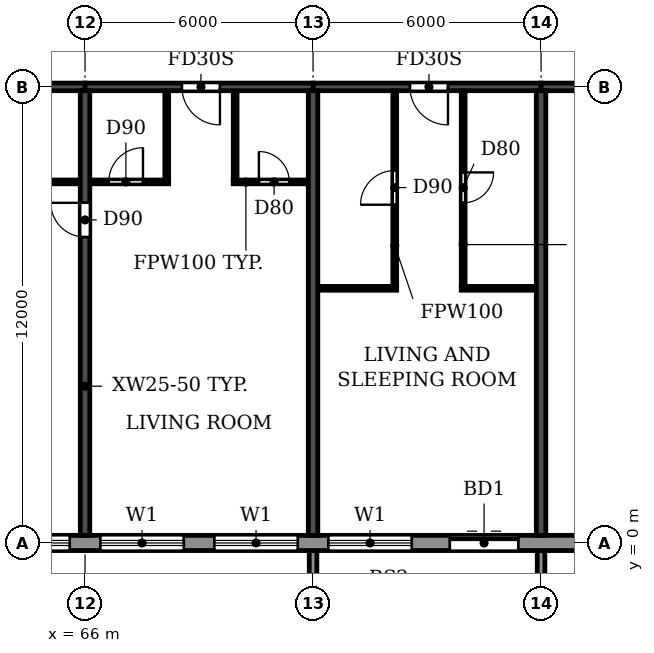
"""IFC4 building model, lengths in metres.
Left out: names, types, materials, properties, quantities, classifications, styles, units other than length and angle.
Written with IfcOpenShell. Run it as: python <this file> out.ifc"""

import sys

from ifc_helpers import new_model, si_unit, direction, frame, frame_2d, origin, place, context, subcontext, project, spatial, polyline, rectangle, outline, extrude, source, transform, mapped, element, fill, save


model = new_model("IFC4")
c1 = context("Model", 3, precision=1e-05, world=origin(), true_north=direction((0.0, 1.0)))
c2 = subcontext(c1, "Body", "Model", "MODEL_VIEW")
j1 = project(units=[si_unit("LENGTHUNIT", "METRE"), si_unit("PLANEANGLEUNIT", "RADIAN")], contexts=[c1])
p1 = place(None, origin())
s1 = spatial("IfcSite", under=j1, at=p1, CompositionType="ELEMENT")
p2 = place(p1, origin())
s2 = spatial("IfcBuilding", under=s1, at=p2, CompositionType="ELEMENT")
p3 = place(p2, frame((0.0, 0.0, 201.6)))
s3 = spatial("IfcBuildingStorey", under=s2, at=p3, CompositionType="ELEMENT", Elevation=201.6)
p4 = place(p3, frame((66.0, 0.2, 0.0), z_axis=(0.0, 0.0, 1.0), x_axis=(0.0, 1.0, 0.0)))
e1 = element("IfcWall", 1, at=p4, inside=s3, PredefinedType="SHEAR", context=c2, shape_type="SweptSolid", body=[
    extrude(rectangle(XDim=11.7, YDim=0.25, at=frame_2d((5.85, 0.0))), origin(), (0.0, 0.0, 1.0), 3.08),
])
p5 = place(p4, frame((7.85, 0.0, 0.0)))
e2 = element("IfcOpeningElement", 2, at=p5, cuts=e1, PredefinedType="OPENING", context=c2, shape_type="SweptSolid", body=[
    extrude(rectangle(XDim=0.9, YDim=2.1, at=frame_2d((0.45, 1.05))), frame((0.0, 0.135, 0.0), z_axis=(0.0, -1.0, 0.0), x_axis=(1.0, 0.0, 0.0)), (0.0, 0.0, 1.0), 0.27),
])
for number, where, z_axis, x_axis in (
    (3, (72.0, 0.2, 0.0), (0.0, 0.0, 1.0), (0.0, 1.0, 0.0)),
    (4, (78.0, 0.2, 0.0), (0.0, 0.0, 1.0), (0.0, 1.0, 0.0)),
):
    element("IfcWall", number, at=place(p3, frame(where, z_axis=z_axis, x_axis=x_axis)), inside=s3, PredefinedType="SHEAR", context=c2, shape_type="SweptSolid", body=[
        extrude(rectangle(XDim=11.7, YDim=0.25, at=frame_2d((5.85, 0.0))), origin(), (0.0, 0.0, 1.0), 3.08),
    ])
p6 = place(p3, frame((60.0, 12.0, 0.0), z_axis=(0.0, 0.0, 1.0), x_axis=(1.0, 0.0, 0.0)))
e5 = element("IfcWall", 5, at=p6, inside=s3, PredefinedType="SHEAR", context=c2, shape_type="SweptSolid", body=[
    extrude(rectangle(XDim=6.0, YDim=0.2, at=frame_2d((3.0, 0.0))), origin(), (0.0, 0.0, 1.0), 2.48),
])
p7 = place(p3, frame((66.0, 12.0, 0.0), z_axis=(0.0, 0.0, 1.0), x_axis=(1.0, 0.0, 0.0)))
e6 = element("IfcWall", 6, at=p7, inside=s3, PredefinedType="SHEAR", context=c2, shape_type="SweptSolid", body=[
    extrude(rectangle(XDim=6.0, YDim=0.2, at=frame_2d((3.0, 0.0))), origin(), (0.0, 0.0, 1.0), 2.48),
])
p8 = place(p7, frame((2.55, 0.0, 0.0)))
e7 = element("IfcOpeningElement", 7, at=p8, cuts=e6, PredefinedType="OPENING", context=c2, shape_type="SweptSolid", body=[
    extrude(rectangle(XDim=1.0, YDim=2.1, at=frame_2d((0.5, 1.05))), frame((0.0, 0.11, 0.0), z_axis=(0.0, -1.0, 0.0), x_axis=(1.0, 0.0, 0.0)), (0.0, 0.0, 1.0), 0.22),
])
p9 = place(p3, frame((72.0, 12.0, 0.0), z_axis=(0.0, 0.0, 1.0), x_axis=(1.0, 0.0, 0.0)))
e8 = element("IfcWall", 8, at=p9, inside=s3, PredefinedType="SHEAR", context=c2, shape_type="SweptSolid", body=[
    extrude(rectangle(XDim=6.0, YDim=0.2, at=frame_2d((3.0, 0.0))), origin(), (0.0, 0.0, 1.0), 2.48),
])
p10 = place(p9, frame((2.55, 0.0, 0.0)))
e9 = element("IfcOpeningElement", 9, at=p10, cuts=e8, PredefinedType="OPENING", context=c2, shape_type="SweptSolid", body=[
    extrude(rectangle(XDim=1.0, YDim=2.1, at=frame_2d((0.5, 1.05))), frame((0.0, 0.11, 0.0), z_axis=(0.0, -1.0, 0.0), x_axis=(1.0, 0.0, 0.0)), (0.0, 0.0, 1.0), 0.22),
])
p11 = place(p3, frame((78.0, 12.0, 0.0), z_axis=(0.0, 0.0, 1.0), x_axis=(1.0, 0.0, 0.0)))
e10 = element("IfcWall", 10, at=p11, inside=s3, PredefinedType="SHEAR", context=c2, shape_type="SweptSolid", body=[
    extrude(rectangle(XDim=5.8, YDim=0.2, at=frame_2d((2.9, 0.0))), origin(), (0.0, 0.0, 1.0), 2.48),
])
p12 = place(p11, frame((2.5, 0.0, 0.0)))
e11 = element("IfcOpeningElement", 11, at=p12, cuts=e10, PredefinedType="OPENING", context=c2, shape_type="SweptSolid", body=[
    extrude(rectangle(XDim=1.0, YDim=2.1, at=frame_2d((0.5, 1.05))), frame((0.0, 0.11, 0.0), z_axis=(0.0, -1.0, 0.0), x_axis=(1.0, 0.0, 0.0)), (0.0, 0.0, 1.0), 0.22),
])
p13 = place(p3, frame((22.683, 0.0, 0.0), z_axis=(0.0, 0.0, 1.0), x_axis=(1.0, 0.0, 0.0)))
e12 = element("IfcWall", 12, at=p13, inside=s3, PredefinedType="STANDARD", context=c2, shape_type="SweptSolid", body=[
    extrude(rectangle(XDim=56.634, YDim=0.4, at=frame_2d((28.317, 0.0))), origin(), (0.0, 0.0, 1.0), 3.08),
])
p14 = place(p13, frame((1.917, 0.0, 0.0)))
e13 = element("IfcOpeningElement", 13, at=p14, cuts=e12, PredefinedType="OPENING", context=c2, shape_type="SweptSolid", body=[
    extrude(rectangle(XDim=1.8, YDim=2.4, at=frame_2d((0.9, 1.2))), frame((0.0, 0.21, 0.0), z_axis=(0.0, -1.0, 0.0), x_axis=(1.0, 0.0, 0.0)), (0.0, 0.0, 1.0), 0.42),
])
p15 = place(p13, frame((4.717, 0.0, 0.9)))
e14 = element("IfcOpeningElement", 14, at=p15, cuts=e12, PredefinedType="OPENING", context=c2, shape_type="SweptSolid", body=[
    extrude(rectangle(XDim=2.2, YDim=1.5, at=frame_2d((1.1, 0.75))), frame((0.0, 0.21, 0.0), z_axis=(0.0, -1.0, 0.0), x_axis=(1.0, 0.0, 0.0)), (0.0, 0.0, 1.0), 0.42),
])
p16 = place(p13, frame((7.717, 0.0, 0.9)))
e15 = element("IfcOpeningElement", 15, at=p16, cuts=e12, PredefinedType="OPENING", context=c2, shape_type="SweptSolid", body=[
    extrude(rectangle(XDim=2.2, YDim=1.5, at=frame_2d((1.1, 0.75))), frame((0.0, 0.21, 0.0), z_axis=(0.0, -1.0, 0.0), x_axis=(1.0, 0.0, 0.0)), (0.0, 0.0, 1.0), 0.42),
])
p17 = place(p13, frame((10.717, 0.0, 0.9)))
e16 = element("IfcOpeningElement", 16, at=p17, cuts=e12, PredefinedType="OPENING", context=c2, shape_type="SweptSolid", body=[
    extrude(rectangle(XDim=2.2, YDim=1.5, at=frame_2d((1.1, 0.75))), frame((0.0, 0.21, 0.0), z_axis=(0.0, -1.0, 0.0), x_axis=(1.0, 0.0, 0.0)), (0.0, 0.0, 1.0), 0.42),
])
p18 = place(p13, frame((13.917, 0.0, 0.0)))
e17 = element("IfcOpeningElement", 17, at=p18, cuts=e12, PredefinedType="OPENING", context=c2, shape_type="SweptSolid", body=[
    extrude(rectangle(XDim=1.8, YDim=2.4, at=frame_2d((0.9, 1.2))), frame((0.0, 0.21, 0.0), z_axis=(0.0, -1.0, 0.0), x_axis=(1.0, 0.0, 0.0)), (0.0, 0.0, 1.0), 0.42),
])
p19 = place(p13, frame((16.717, 0.0, 0.9)))
e18 = element("IfcOpeningElement", 18, at=p19, cuts=e12, PredefinedType="OPENING", context=c2, shape_type="SweptSolid", body=[
    extrude(rectangle(XDim=2.2, YDim=1.5, at=frame_2d((1.1, 0.75))), frame((0.0, 0.21, 0.0), z_axis=(0.0, -1.0, 0.0), x_axis=(1.0, 0.0, 0.0)), (0.0, 0.0, 1.0), 0.42),
])
p20 = place(p13, frame((19.717, 0.0, 0.9)))
e19 = element("IfcOpeningElement", 19, at=p20, cuts=e12, PredefinedType="OPENING", context=c2, shape_type="SweptSolid", body=[
    extrude(rectangle(XDim=2.2, YDim=1.5, at=frame_2d((1.1, 0.75))), frame((0.0, 0.21, 0.0), z_axis=(0.0, -1.0, 0.0), x_axis=(1.0, 0.0, 0.0)), (0.0, 0.0, 1.0), 0.42),
])
p21 = place(p13, frame((22.717, 0.0, 0.9)))
e20 = element("IfcOpeningElement", 20, at=p21, cuts=e12, PredefinedType="OPENING", context=c2, shape_type="SweptSolid", body=[
    extrude(rectangle(XDim=2.2, YDim=1.5, at=frame_2d((1.1, 0.75))), frame((0.0, 0.21, 0.0), z_axis=(0.0, -1.0, 0.0), x_axis=(1.0, 0.0, 0.0)), (0.0, 0.0, 1.0), 0.42),
])
p22 = place(p13, frame((25.917, 0.0, 0.0)))
e21 = element("IfcOpeningElement", 21, at=p22, cuts=e12, PredefinedType="OPENING", context=c2, shape_type="SweptSolid", body=[
    extrude(rectangle(XDim=1.8, YDim=2.4, at=frame_2d((0.9, 1.2))), frame((0.0, 0.21, 0.0), z_axis=(0.0, -1.0, 0.0), x_axis=(1.0, 0.0, 0.0)), (0.0, 0.0, 1.0), 0.42),
])
p23 = place(p13, frame((28.717, 0.0, 0.9)))
e22 = element("IfcOpeningElement", 22, at=p23, cuts=e12, PredefinedType="OPENING", context=c2, shape_type="SweptSolid", body=[
    extrude(rectangle(XDim=2.2, YDim=1.5, at=frame_2d((1.1, 0.75))), frame((0.0, 0.21, 0.0), z_axis=(0.0, -1.0, 0.0), x_axis=(1.0, 0.0, 0.0)), (0.0, 0.0, 1.0), 0.42),
])
p24 = place(p13, frame((31.717, 0.0, 0.9)))
e23 = element("IfcOpeningElement", 23, at=p24, cuts=e12, PredefinedType="OPENING", context=c2, shape_type="SweptSolid", body=[
    extrude(rectangle(XDim=2.2, YDim=1.5, at=frame_2d((1.1, 0.75))), frame((0.0, 0.21, 0.0), z_axis=(0.0, -1.0, 0.0), x_axis=(1.0, 0.0, 0.0)), (0.0, 0.0, 1.0), 0.42),
])
p25 = place(p13, frame((34.717, 0.0, 0.9)))
e24 = element("IfcOpeningElement", 24, at=p25, cuts=e12, PredefinedType="OPENING", context=c2, shape_type="SweptSolid", body=[
    extrude(rectangle(XDim=2.2, YDim=1.5, at=frame_2d((1.1, 0.75))), frame((0.0, 0.21, 0.0), z_axis=(0.0, -1.0, 0.0), x_axis=(1.0, 0.0, 0.0)), (0.0, 0.0, 1.0), 0.42),
])
p26 = place(p13, frame((37.717, 0.0, 0.9)))
e25 = element("IfcOpeningElement", 25, at=p26, cuts=e12, PredefinedType="OPENING", context=c2, shape_type="SweptSolid", body=[
    extrude(rectangle(XDim=2.2, YDim=1.5, at=frame_2d((1.1, 0.75))), frame((0.0, 0.21, 0.0), z_axis=(0.0, -1.0, 0.0), x_axis=(1.0, 0.0, 0.0)), (0.0, 0.0, 1.0), 0.42),
])
p27 = place(p13, frame((40.717, 0.0, 0.9)))
e26 = element("IfcOpeningElement", 26, at=p27, cuts=e12, PredefinedType="OPENING", context=c2, shape_type="SweptSolid", body=[
    extrude(rectangle(XDim=2.2, YDim=1.5, at=frame_2d((1.1, 0.75))), frame((0.0, 0.21, 0.0), z_axis=(0.0, -1.0, 0.0), x_axis=(1.0, 0.0, 0.0)), (0.0, 0.0, 1.0), 0.42),
])
p28 = place(p13, frame((43.717, 0.0, 0.9)))
e27 = element("IfcOpeningElement", 27, at=p28, cuts=e12, PredefinedType="OPENING", context=c2, shape_type="SweptSolid", body=[
    extrude(rectangle(XDim=2.2, YDim=1.5, at=frame_2d((1.1, 0.75))), frame((0.0, 0.21, 0.0), z_axis=(0.0, -1.0, 0.0), x_axis=(1.0, 0.0, 0.0)), (0.0, 0.0, 1.0), 0.42),
])
p29 = place(p13, frame((46.717, 0.0, 0.9)))
e28 = element("IfcOpeningElement", 28, at=p29, cuts=e12, PredefinedType="OPENING", context=c2, shape_type="SweptSolid", body=[
    extrude(rectangle(XDim=2.2, YDim=1.5, at=frame_2d((1.1, 0.75))), frame((0.0, 0.21, 0.0), z_axis=(0.0, -1.0, 0.0), x_axis=(1.0, 0.0, 0.0)), (0.0, 0.0, 1.0), 0.42),
])
p30 = place(p13, frame((49.717, 0.0, 0.9)))
e29 = element("IfcOpeningElement", 29, at=p30, cuts=e12, PredefinedType="OPENING", context=c2, shape_type="SweptSolid", body=[
    extrude(rectangle(XDim=2.2, YDim=1.5, at=frame_2d((1.1, 0.75))), frame((0.0, 0.21, 0.0), z_axis=(0.0, -1.0, 0.0), x_axis=(1.0, 0.0, 0.0)), (0.0, 0.0, 1.0), 0.42),
])
p31 = place(p13, frame((52.917, 0.0, 0.0)))
e30 = element("IfcOpeningElement", 30, at=p31, cuts=e12, PredefinedType="OPENING", context=c2, shape_type="SweptSolid", body=[
    extrude(rectangle(XDim=1.8, YDim=2.4, at=frame_2d((0.9, 1.2))), frame((0.0, 0.21, 0.0), z_axis=(0.0, -1.0, 0.0), x_axis=(1.0, 0.0, 0.0)), (0.0, 0.0, 1.0), 0.42),
])
m1 = source(origin(), c2, "Body", "SweptSolid", [
    extrude(outline(polyline([(0.0, 0.0), (0.2, 0.0), (0.2, 1.65), (0.0, 1.65), (0.0, 0.0)])), origin(), (0.0, 0.0, 1.0), 3.1),
])
for number, where in (
    (31, (71.9, -1.85, 0.0)),
    (32, (77.9, -1.85, 0.0)),
):
    element("IfcWall", number, at=place(p3, frame(where)), inside=s3, PredefinedType="STANDARD", context=c2, shape_type="MappedRepresentation", body=[
        mapped(m1, transform((0.0, 0.0, 0.0))),
    ])
p32 = place(p3, frame((72.135, 6.7, 0.0), z_axis=(0.0, 0.0, 1.0), x_axis=(1.0, 0.0, 0.0)))
e33 = element("IfcWall", 33, at=p32, inside=s3, PredefinedType="PARTITIONING", context=c2, shape_type="SweptSolid", body=[
    extrude(rectangle(XDim=2.065, YDim=0.1, at=frame_2d((1.032, 0.0))), origin(), (0.0, 0.0, 1.0), 3.08),
])
p33 = place(p3, frame((75.9, 6.7, 0.0), z_axis=(0.0, 0.0, 1.0), x_axis=(1.0, 0.0, 0.0)))
e34 = element("IfcWall", 34, at=p33, inside=s3, PredefinedType="PARTITIONING", context=c2, shape_type="SweptSolid", body=[
    extrude(rectangle(XDim=1.965, YDim=0.1, at=frame_2d((0.982, 0.0))), origin(), (0.0, 0.0, 1.0), 3.08),
])
p34 = place(p3, frame((63.1, 9.5, 0.0), z_axis=(0.0, 0.0, 1.0), x_axis=(1.0, 0.0, 0.0)))
e35 = element("IfcWall", 35, at=p34, inside=s3, PredefinedType="PARTITIONING", context=c2, shape_type="SweptSolid", body=[
    extrude(rectangle(XDim=2.765, YDim=0.1, at=frame_2d((1.382, 0.0))), origin(), (0.0, 0.0, 1.0), 3.08),
])
p35 = place(p34, frame((1.0, 0.0, 0.0)))
e36 = element("IfcOpeningElement", 36, at=p35, cuts=e35, PredefinedType="OPENING", context=c2, shape_type="SweptSolid", body=[
    extrude(rectangle(XDim=0.8, YDim=2.1, at=frame_2d((0.4, 1.05))), frame((0.0, 0.06, 0.0), z_axis=(0.0, -1.0, 0.0), x_axis=(1.0, 0.0, 0.0)), (0.0, 0.0, 1.0), 0.12),
])
p36 = place(p3, frame((66.135, 9.5, 0.0), z_axis=(0.0, 0.0, 1.0), x_axis=(1.0, 0.0, 0.0)))
e37 = element("IfcWall", 37, at=p36, inside=s3, PredefinedType="PARTITIONING", context=c2, shape_type="SweptSolid", body=[
    extrude(rectangle(XDim=2.065, YDim=0.1, at=frame_2d((1.032, 0.0))), origin(), (0.0, 0.0, 1.0), 3.08),
])
p37 = place(p36, frame((0.49, 0.0, 0.0)))
e38 = element("IfcOpeningElement", 38, at=p37, cuts=e37, PredefinedType="OPENING", context=c2, shape_type="SweptSolid", body=[
    extrude(rectangle(XDim=0.9, YDim=2.1, at=frame_2d((0.45, 1.05))), frame((0.0, 0.06, 0.0), z_axis=(0.0, -1.0, 0.0), x_axis=(1.0, 0.0, 0.0)), (0.0, 0.0, 1.0), 0.12),
])
p38 = place(p3, frame((69.9, 9.5, 0.0), z_axis=(0.0, 0.0, 1.0), x_axis=(1.0, 0.0, 0.0)))
e39 = element("IfcWall", 39, at=p38, inside=s3, PredefinedType="PARTITIONING", context=c2, shape_type="SweptSolid", body=[
    extrude(rectangle(XDim=1.965, YDim=0.1, at=frame_2d((0.982, 0.0))), origin(), (0.0, 0.0, 1.0), 3.08),
])
p39 = place(p38, frame((0.675, 0.0, 0.0)))
e40 = element("IfcOpeningElement", 40, at=p39, cuts=e39, PredefinedType="OPENING", context=c2, shape_type="SweptSolid", body=[
    extrude(rectangle(XDim=0.8, YDim=2.1, at=frame_2d((0.4, 1.05))), frame((0.0, 0.06, 0.0), z_axis=(0.0, -1.0, 0.0), x_axis=(1.0, 0.0, 0.0)), (0.0, 0.0, 1.0), 0.12),
])
for number, where, z_axis, x_axis in (
    (41, (68.15, 9.55, 0.0), (0.0, 0.0, 1.0), (0.0, 1.0, 0.0)),
    (42, (69.95, 9.55, 0.0), (0.0, 0.0, 1.0), (0.0, 1.0, 0.0)),
):
    element("IfcWall", number, at=place(p3, frame(where, z_axis=z_axis, x_axis=x_axis)), inside=s3, PredefinedType="PARTITIONING", context=c2, shape_type="SweptSolid", body=[
        extrude(rectangle(XDim=2.34, YDim=0.1, at=frame_2d((1.17, 0.0))), origin(), (0.0, 0.0, 1.0), 3.08),
    ])
p40 = place(p3, frame((74.15, 6.75, 0.0), z_axis=(0.0, 0.0, 1.0), x_axis=(0.0, 1.0, 0.0)))
e43 = element("IfcWall", 43, at=p40, inside=s3, PredefinedType="PARTITIONING", context=c2, shape_type="SweptSolid", body=[
    extrude(rectangle(XDim=5.14, YDim=0.1, at=frame_2d((2.57, 0.0))), origin(), (0.0, 0.0, 1.0), 3.08),
])
p41 = place(p40, frame((2.15, 0.0, 0.0)))
e44 = element("IfcOpeningElement", 44, at=p41, cuts=e43, PredefinedType="OPENING", context=c2, shape_type="SweptSolid", body=[
    extrude(rectangle(XDim=0.9, YDim=2.1, at=frame_2d((0.45, 1.05))), frame((0.0, 0.06, 0.0), z_axis=(0.0, -1.0, 0.0), x_axis=(1.0, 0.0, 0.0)), (0.0, 0.0, 1.0), 0.12),
])
p42 = place(p3, frame((75.95, 6.75, 0.0), z_axis=(0.0, 0.0, 1.0), x_axis=(0.0, 1.0, 0.0)))
e45 = element("IfcWall", 45, at=p42, inside=s3, PredefinedType="PARTITIONING", context=c2, shape_type="SweptSolid", body=[
    extrude(rectangle(XDim=5.14, YDim=0.1, at=frame_2d((2.57, 0.0))), origin(), (0.0, 0.0, 1.0), 3.08),
])
p43 = place(p42, frame((2.2, 0.0, 0.0)))
e46 = element("IfcOpeningElement", 46, at=p43, cuts=e45, PredefinedType="OPENING", context=c2, shape_type="SweptSolid", body=[
    extrude(rectangle(XDim=0.8, YDim=2.1, at=frame_2d((0.4, 1.05))), frame((0.0, 0.06, 0.0), z_axis=(0.0, -1.0, 0.0), x_axis=(1.0, 0.0, 0.0)), (0.0, 0.0, 1.0), 0.12),
])
p44 = place(p27, origin())
e47 = element("IfcWindow", 47, at=p44, inside=s3, PartitioningType="DOUBLE_PANEL_HORIZONTAL", PredefinedType="WINDOW", context=c2, shape_type="SweptSolid", body=[
    extrude(rectangle(XDim=2.2, YDim=1.5, at=frame_2d((1.1, 0.75))), frame((0.0, 0.03, 0.0), z_axis=(0.0, -1.0, 0.0), x_axis=(1.0, 0.0, 0.0)), (0.0, 0.0, 1.0), 0.06),
])
fill(e26, e47)
p45 = place(p28, origin())
e48 = element("IfcWindow", 48, at=p45, inside=s3, PartitioningType="DOUBLE_PANEL_HORIZONTAL", PredefinedType="WINDOW", context=c2, shape_type="SweptSolid", body=[
    extrude(rectangle(XDim=2.2, YDim=1.5, at=frame_2d((1.1, 0.75))), frame((0.0, 0.03, 0.0), z_axis=(0.0, -1.0, 0.0), x_axis=(1.0, 0.0, 0.0)), (0.0, 0.0, 1.0), 0.06),
])
fill(e27, e48)
p46 = place(p29, origin())
e49 = element("IfcWindow", 49, at=p46, inside=s3, PartitioningType="DOUBLE_PANEL_HORIZONTAL", PredefinedType="WINDOW", context=c2, shape_type="SweptSolid", body=[
    extrude(rectangle(XDim=2.2, YDim=1.5, at=frame_2d((1.1, 0.75))), frame((0.0, 0.03, 0.0), z_axis=(0.0, -1.0, 0.0), x_axis=(1.0, 0.0, 0.0)), (0.0, 0.0, 1.0), 0.06),
])
fill(e28, e49)
p47 = place(p30, origin())
e50 = element("IfcWindow", 50, at=p47, inside=s3, PartitioningType="DOUBLE_PANEL_HORIZONTAL", PredefinedType="WINDOW", context=c2, shape_type="SweptSolid", body=[
    extrude(rectangle(XDim=2.2, YDim=1.5, at=frame_2d((1.1, 0.75))), frame((0.0, 0.03, 0.0), z_axis=(0.0, -1.0, 0.0), x_axis=(1.0, 0.0, 0.0)), (0.0, 0.0, 1.0), 0.06),
])
fill(e29, e50)
p48 = place(p31, origin())
e51 = element("IfcDoor", 51, at=p48, inside=s3, OperationType="DOUBLE_DOOR_SLIDING", PredefinedType="DOOR", context=c2, shape_type="SweptSolid", body=[
    extrude(rectangle(XDim=1.8, YDim=2.4, at=frame_2d((0.9, 1.2))), frame((0.0, 0.025, 0.0), z_axis=(0.0, -1.0, 0.0), x_axis=(1.0, 0.0, 0.0)), (0.0, 0.0, 1.0), 0.05),
])
fill(e30, e51)
p49 = place(p5, origin())
e52 = element("IfcDoor", 52, at=p49, inside=s3, OperationType="SINGLE_SWING_RIGHT", PredefinedType="DOOR", context=c2, shape_type="SweptSolid", body=[
    extrude(rectangle(XDim=0.9, YDim=2.1, at=frame_2d((0.45, 1.05))), frame((0.0, 0.025, 0.0), z_axis=(0.0, -1.0, 0.0), x_axis=(1.0, 0.0, 0.0)), (0.0, 0.0, 1.0), 0.05),
])
fill(e2, e52)
p50 = place(p37, origin())
e53 = element("IfcDoor", 53, at=p50, inside=s3, OperationType="SINGLE_SWING_RIGHT", PredefinedType="DOOR", context=c2, shape_type="SweptSolid", body=[
    extrude(rectangle(XDim=0.9, YDim=2.1, at=frame_2d((0.45, 1.05))), frame((0.0, 0.025, 0.0), z_axis=(0.0, -1.0, 0.0), x_axis=(1.0, 0.0, 0.0)), (0.0, 0.0, 1.0), 0.05),
])
fill(e38, e53)
p51 = place(p8, frame((1.0, 0.0, 0.0), z_axis=(0.0, 0.0, 1.0), x_axis=(-1.0, 0.0, 0.0)))
e54 = element("IfcDoor", 54, at=p51, inside=s3, OperationType="SINGLE_SWING_LEFT", PredefinedType="DOOR", context=c2, shape_type="SweptSolid", body=[
    extrude(rectangle(XDim=1.0, YDim=2.1, at=frame_2d((0.5, 1.05))), frame((0.0, 0.025, 0.0), z_axis=(0.0, -1.0, 0.0), x_axis=(1.0, 0.0, 0.0)), (0.0, 0.0, 1.0), 0.05),
])
fill(e7, e54)
p52 = place(p39, origin())
e55 = element("IfcDoor", 55, at=p52, inside=s3, OperationType="SINGLE_SWING_LEFT", PredefinedType="DOOR", context=c2, shape_type="SweptSolid", body=[
    extrude(rectangle(XDim=0.8, YDim=2.1, at=frame_2d((0.4, 1.05))), frame((0.0, 0.025, 0.0), z_axis=(0.0, -1.0, 0.0), x_axis=(1.0, 0.0, 0.0)), (0.0, 0.0, 1.0), 0.05),
])
fill(e40, e55)
p53 = place(p41, origin())
e56 = element("IfcDoor", 56, at=p53, inside=s3, OperationType="SINGLE_SWING_LEFT", PredefinedType="DOOR", context=c2, shape_type="SweptSolid", body=[
    extrude(rectangle(XDim=0.9, YDim=2.1, at=frame_2d((0.45, 1.05))), frame((0.0, 0.025, 0.0), z_axis=(0.0, -1.0, 0.0), x_axis=(1.0, 0.0, 0.0)), (0.0, 0.0, 1.0), 0.05),
])
fill(e44, e56)
p54 = place(p10, frame((1.0, 0.0, 0.0), z_axis=(0.0, 0.0, 1.0), x_axis=(-1.0, 0.0, 0.0)))
e57 = element("IfcDoor", 57, at=p54, inside=s3, OperationType="SINGLE_SWING_LEFT", PredefinedType="DOOR", context=c2, shape_type="SweptSolid", body=[
    extrude(rectangle(XDim=1.0, YDim=2.1, at=frame_2d((0.5, 1.05))), frame((0.0, 0.025, 0.0), z_axis=(0.0, -1.0, 0.0), x_axis=(1.0, 0.0, 0.0)), (0.0, 0.0, 1.0), 0.05),
])
fill(e9, e57)
p55 = place(p43, frame((0.8, 0.0, 0.0), z_axis=(0.0, 0.0, 1.0), x_axis=(-1.0, 0.0, 0.0)))
e58 = element("IfcDoor", 58, at=p55, inside=s3, OperationType="SINGLE_SWING_LEFT", PredefinedType="DOOR", context=c2, shape_type="SweptSolid", body=[
    extrude(rectangle(XDim=0.8, YDim=2.1, at=frame_2d((0.4, 1.05))), frame((0.0, 0.025, 0.0), z_axis=(0.0, -1.0, 0.0), x_axis=(1.0, 0.0, 0.0)), (0.0, 0.0, 1.0), 0.05),
])
fill(e46, e58)
save(model, sys.argv[1])
